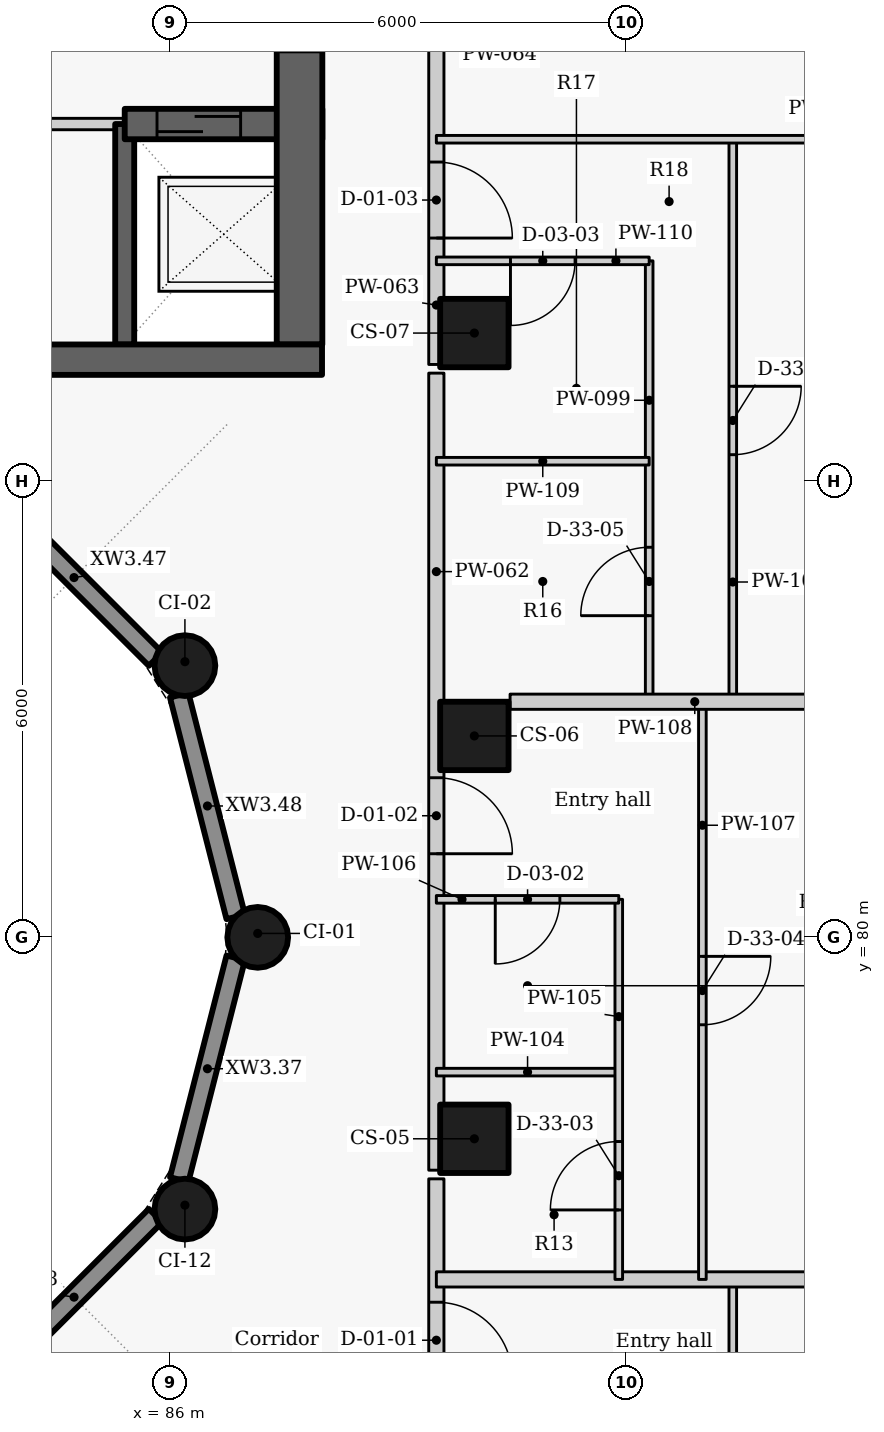
"""IFC4 building model, lengths in metres.
Left out: names, types, materials, properties, quantities, classifications, styles, units other than length and angle.
Written with IfcOpenShell. Run it as: python <this file> out.ifc"""

import sys

from ifc_helpers import new_model, si_unit, direction, frame, frame_2d, origin, origin_2d, place, context, subcontext, project, spatial, rectangle, circle, extrude, element, fill, save


model = new_model("IFC4")
c1 = context("Model", 3, precision=1e-05, world=origin(), true_north=direction((0.0, 1.0)))
c2 = subcontext(c1, "Body", "Model", "MODEL_VIEW")
j1 = project(units=[si_unit("LENGTHUNIT", "METRE"), si_unit("PLANEANGLEUNIT", "RADIAN")], contexts=[c1])
p1 = place(None, origin())
s1 = spatial("IfcSite", under=j1, at=p1, CompositionType="ELEMENT")
p2 = place(p1, origin())
s2 = spatial("IfcBuilding", under=s1, at=p2, CompositionType="ELEMENT")
p3 = place(p2, frame((0.0, 0.0, 259.2)))
s3 = spatial("IfcBuildingStorey", under=s2, at=p3, CompositionType="ELEMENT", Elevation=259.2)
for number, where, z_axis, x_axis in (
    (1, (90.0, 77.35, 0.0), (0.0, 0.0, 1.0), (0.0, 1.0, 0.0)),
    (2, (90.0, 82.65, 0.0), (0.0, 0.0, 1.0), (0.0, 1.0, 0.0)),
    (3, (90.0, 87.95, 0.0), (0.0, 0.0, 1.0), (0.0, 1.0, 0.0)),
):
    element("IfcColumn", number, at=place(p3, frame(where, z_axis=z_axis, x_axis=x_axis)), inside=s3, PredefinedType="COLUMN", context=c2, shape_type="SweptSolid", body=[
        extrude(rectangle(XDim=0.9, YDim=0.9, at=origin_2d()), origin(), (0.0, 0.0, 1.0), 3.3),
    ])
for number, where, z_axis, x_axis in (
    (4, (87.15, 80.0, 0.0), (0.0, 0.0, 1.0), (0.0, 1.0, 0.0)),
    (5, (86.192, 83.575, 0.0), (0.0, 0.0, 1.0), (-0.5, 0.866, 0.0)),
    (6, (86.192, 76.425, 0.0), (0.0, 0.0, 1.0), (0.5, 0.866, 0.0)),
):
    element("IfcColumn", number, at=place(p3, frame(where, z_axis=z_axis, x_axis=x_axis)), inside=s3, PredefinedType="COLUMN", context=c2, shape_type="SweptSolid", body=[
        extrude(circle(Radius=0.4, at=origin_2d()), origin(), (0.0, 0.0, 1.0), 3.3),
    ])
p4 = place(p3, frame((86.86, 79.73, 0.0), z_axis=(0.0, 0.0, 1.0), x_axis=(-0.247055971283, -0.969001211069, 0.0)))
e7 = element("IfcWall", 7, at=p4, inside=s3, PredefinedType="SOLIDWALL", context=c2, shape_type="SweptSolid", body=[
    extrude(rectangle(XDim=3.01, YDim=0.25, at=frame_2d((1.505, 0.0))), origin(), (0.0, 0.0, 1.0), 2.425),
])
for number, where, z_axis, x_axis in (
    (8, (85.806, 76.339, 0.0), (0.0, 0.0, 1.0), (-0.707, -0.707, 0.0)),
    (9, (83.661, 85.806, 0.0), (0.0, 0.0, 1.0), (0.707, -0.707, 0.0)),
):
    element("IfcWall", number, at=place(p3, frame(where, z_axis=z_axis, x_axis=x_axis)), inside=s3, PredefinedType="SOLIDWALL", context=c2, shape_type="SweptSolid", body=[
        extrude(rectangle(XDim=3.033, YDim=0.25, at=frame_2d((1.517, 0.0))), origin(), (0.0, 0.0, 1.0), 2.425),
    ])
p5 = place(p3, frame((86.117, 83.187, 0.0), z_axis=(0.0, 0.0, 1.0), x_axis=(0.247055971283, -0.969001211069, 0.0)))
e10 = element("IfcWall", 10, at=p5, inside=s3, PredefinedType="SOLIDWALL", context=c2, shape_type="SweptSolid", body=[
    extrude(rectangle(XDim=3.01, YDim=0.25, at=frame_2d((1.505, 0.0))), origin(), (0.0, 0.0, 1.0), 2.425),
])
p6 = place(p3, frame((85.4, 90.7, 0.0), z_axis=(0.0, 0.0, 1.0), x_axis=(-1.0, 0.0, 0.0)))
e11 = element("IfcWall", 11, at=p6, inside=s3, PredefinedType="PARTITIONING", context=c2, shape_type="SweptSolid", body=[
    extrude(rectangle(XDim=13.4, YDim=0.15, at=frame_2d((6.7, 0.0))), origin(), (0.0, 0.0, 1.0), 3.025),
])
p7 = place(p6, frame((11.325, 0.0, 0.0)))
e12 = element("IfcOpeningElement", 12, at=p7, cuts=e11, PredefinedType="OPENING", context=c2, shape_type="SweptSolid", body=[
    extrude(rectangle(XDim=0.9, YDim=2.1, at=frame_2d((0.45, 1.05))), frame((0.0, 0.085, 0.0), z_axis=(0.0, -1.0, 0.0), x_axis=(1.0, 0.0, 0.0)), (0.0, 0.0, 1.0), 0.17),
])
p8 = place(p6, frame((9.0, 0.0, 0.0)))
e13 = element("IfcOpeningElement", 13, at=p8, cuts=e11, PredefinedType="OPENING", context=c2, shape_type="SweptSolid", body=[
    extrude(rectangle(XDim=0.9, YDim=2.1, at=frame_2d((0.45, 1.05))), frame((0.0, 0.085, 0.0), z_axis=(0.0, -1.0, 0.0), x_axis=(1.0, 0.0, 0.0)), (0.0, 0.0, 1.0), 0.17),
])
p9 = place(p6, frame((3.6, 0.0, 0.0)))
e14 = element("IfcOpeningElement", 14, at=p9, cuts=e11, PredefinedType="OPENING", context=c2, shape_type="SweptSolid", body=[
    extrude(rectangle(XDim=0.9, YDim=2.1, at=frame_2d((0.45, 1.05))), frame((0.0, 0.085, 0.0), z_axis=(0.0, -1.0, 0.0), x_axis=(1.0, 0.0, 0.0)), (0.0, 0.0, 1.0), 0.17),
])
p10 = place(p3, frame((85.4, 87.8, -0.275), z_axis=(0.0, 0.0, 1.0), x_axis=(0.0, 1.0, 0.0)))
e15 = element("IfcWall", 15, at=p10, inside=s3, PredefinedType="SHEAR", context=c2, shape_type="SweptSolid", body=[
    extrude(rectangle(XDim=2.9, YDim=0.25, at=frame_2d((1.45, 0.0))), origin(), (0.0, 0.0, 1.0), 3.3),
])
p11 = place(p3, frame((85.4, 90.7, -0.275), z_axis=(0.0, 0.0, 1.0), x_axis=(1.0, 0.0, 0.0)))
e16 = element("IfcWall", 16, at=p11, inside=s3, PredefinedType="SHEAR", context=c2, shape_type="SweptSolid", body=[
    extrude(rectangle(XDim=2.6, YDim=0.4, at=frame_2d((1.3, 0.0))), origin(), (0.0, 0.0, 1.0), 3.3),
])
p12 = place(p11, frame((0.425, 0.0, 0.275)))
e17 = element("IfcOpeningElement", 17, at=p12, cuts=e16, PredefinedType="OPENING", context=c2, shape_type="SweptSolid", body=[
    extrude(rectangle(XDim=1.1, YDim=2.1, at=frame_2d((0.55, 1.05))), frame((0.0, 0.21, 0.0), z_axis=(0.0, -1.0, 0.0), x_axis=(1.0, 0.0, 0.0)), (0.0, 0.0, 1.0), 0.42),
])
p13 = place(p3, frame((87.7, 102.05, -0.275), z_axis=(0.0, 0.0, 1.0), x_axis=(0.0, -1.0, 0.0)))
e18 = element("IfcWall", 18, at=p13, inside=s3, PredefinedType="SHEAR", context=c2, shape_type="SweptSolid", body=[
    extrude(rectangle(XDim=14.25, YDim=0.6, at=frame_2d((7.125, 0.0))), origin(), (0.0, 0.0, 1.0), 3.3),
])
p14 = place(p13, frame((8.9, 0.0, 0.275)))
e19 = element("IfcOpeningElement", 19, at=p14, cuts=e18, PredefinedType="OPENING", context=c2, shape_type="SweptSolid", body=[
    extrude(rectangle(XDim=1.5, YDim=2.1, at=frame_2d((0.75, 1.05))), frame((0.0, 0.31, 0.0), z_axis=(0.0, -1.0, 0.0), x_axis=(1.0, 0.0, 0.0)), (0.0, 0.0, 1.0), 0.62),
])
p15 = place(p13, frame((2.025, 0.0, 0.275)))
e20 = element("IfcOpeningElement", 20, at=p15, cuts=e18, PredefinedType="OPENING", context=c2, shape_type="SweptSolid", body=[
    extrude(rectangle(XDim=1.1, YDim=2.1, at=frame_2d((0.55, 1.05))), frame((0.0, 0.31, 0.0), z_axis=(0.0, -1.0, 0.0), x_axis=(1.0, 0.0, 0.0)), (0.0, 0.0, 1.0), 0.62),
])
p16 = place(p3, frame((89.5, 76.823, 0.0), z_axis=(0.0, 0.0, 1.0), x_axis=(0.0, -1.0, 0.0)))
e21 = element("IfcWall", 21, at=p16, inside=s3, PredefinedType="PARTITIONING", context=c2, shape_type="SweptSolid", body=[
    extrude(rectangle(XDim=5.186, YDim=0.2, at=frame_2d((2.593, 0.0))), origin(), (0.0, 0.0, 1.0), 3.025),
])
p17 = place(p16, frame((1.623, 0.0, 0.0)))
e22 = element("IfcOpeningElement", 22, at=p17, cuts=e21, PredefinedType="OPENING", context=c2, shape_type="SweptSolid", body=[
    extrude(rectangle(XDim=1.0, YDim=2.1, at=frame_2d((0.5, 1.05))), frame((0.0, 0.11, 0.0), z_axis=(0.0, -1.0, 0.0), x_axis=(1.0, 0.0, 0.0)), (0.0, 0.0, 1.0), 0.22),
])
p18 = place(p3, frame((89.5, 87.423, 0.0), z_axis=(0.0, 0.0, 1.0), x_axis=(0.0, -1.0, 0.0)))
e23 = element("IfcWall", 23, at=p18, inside=s3, PredefinedType="PARTITIONING", context=c2, shape_type="SweptSolid", body=[
    extrude(rectangle(XDim=10.486, YDim=0.2, at=frame_2d((5.243, 0.0))), origin(), (0.0, 0.0, 1.0), 3.025),
])
p19 = place(p18, frame((5.323, 0.0, 0.0)))
e24 = element("IfcOpeningElement", 24, at=p19, cuts=e23, PredefinedType="OPENING", context=c2, shape_type="SweptSolid", body=[
    extrude(rectangle(XDim=1.0, YDim=2.1, at=frame_2d((0.5, 1.05))), frame((0.0, 0.11, 0.0), z_axis=(0.0, -1.0, 0.0), x_axis=(1.0, 0.0, 0.0)), (0.0, 0.0, 1.0), 0.22),
])
p20 = place(p3, frame((89.5, 91.773, 0.0), z_axis=(0.0, 0.0, 1.0), x_axis=(0.0, -1.0, 0.0)))
e25 = element("IfcWall", 25, at=p20, inside=s3, PredefinedType="PARTITIONING", context=c2, shape_type="SweptSolid", body=[
    extrude(rectangle(XDim=4.236, YDim=0.2, at=frame_2d((2.118, 0.0))), origin(), (0.0, 0.0, 1.0), 3.025),
])
p21 = place(p20, frame((1.573, 0.0, 0.0)))
e26 = element("IfcOpeningElement", 26, at=p21, cuts=e25, PredefinedType="OPENING", context=c2, shape_type="SweptSolid", body=[
    extrude(rectangle(XDim=1.0, YDim=2.1, at=frame_2d((0.5, 1.05))), frame((0.0, 0.11, 0.0), z_axis=(0.0, -1.0, 0.0), x_axis=(1.0, 0.0, 0.0)), (0.0, 0.0, 1.0), 0.22),
])
p22 = place(p3, frame((92.3, 83.1, 0.0), z_axis=(0.0, 0.0, 1.0), x_axis=(0.0, 1.0, 0.0)))
e27 = element("IfcWall", 27, at=p22, inside=s3, PredefinedType="PARTITIONING", context=c2, shape_type="SweptSolid", body=[
    extrude(rectangle(XDim=5.8, YDim=0.1, at=frame_2d((2.9, 0.0))), origin(), (0.0, 0.0, 1.0), 3.025),
])
p23 = place(p22, frame((1.132, 0.0, 0.0)))
e28 = element("IfcOpeningElement", 28, at=p23, cuts=e27, PredefinedType="OPENING", context=c2, shape_type="SweptSolid", body=[
    extrude(rectangle(XDim=0.9, YDim=2.1, at=frame_2d((0.45, 1.05))), frame((0.0, 0.06, 0.0), z_axis=(0.0, -1.0, 0.0), x_axis=(1.0, 0.0, 0.0)), (0.0, 0.0, 1.0), 0.12),
])
p24 = place(p3, frame((93.4, 75.5, 0.0), z_axis=(0.0, 0.0, 1.0), x_axis=(0.0, -1.0, 0.0)))
e29 = element("IfcWall", 29, at=p24, inside=s3, PredefinedType="PARTITIONING", context=c2, shape_type="SweptSolid", body=[
    extrude(rectangle(XDim=9.05, YDim=0.1, at=frame_2d((4.525, 0.0))), origin(), (0.0, 0.0, 1.0), 3.025),
])
p25 = place(p24, frame((4.075, 0.0, 0.0)))
e30 = element("IfcOpeningElement", 30, at=p25, cuts=e29, PredefinedType="OPENING", context=c2, shape_type="SweptSolid", body=[
    extrude(rectangle(XDim=0.9, YDim=2.1, at=frame_2d((0.45, 1.05))), frame((0.0, 0.06, 0.0), z_axis=(0.0, -1.0, 0.0), x_axis=(1.0, 0.0, 0.0)), (0.0, 0.0, 1.0), 0.12),
])
p26 = place(p3, frame((93.4, 90.5, 0.0), z_axis=(0.0, 0.0, 1.0), x_axis=(0.0, -1.0, 0.0)))
e31 = element("IfcWall", 31, at=p26, inside=s3, PredefinedType="PARTITIONING", context=c2, shape_type="SweptSolid", body=[
    extrude(rectangle(XDim=7.4, YDim=0.1, at=frame_2d((3.7, 0.0))), origin(), (0.0, 0.0, 1.0), 3.025),
])
p27 = place(p26, frame((3.25, 0.0, 0.0)))
e32 = element("IfcOpeningElement", 32, at=p27, cuts=e31, PredefinedType="OPENING", context=c2, shape_type="SweptSolid", body=[
    extrude(rectangle(XDim=0.9, YDim=2.1, at=frame_2d((0.45, 1.05))), frame((0.0, 0.06, 0.0), z_axis=(0.0, -1.0, 0.0), x_axis=(1.0, 0.0, 0.0)), (0.0, 0.0, 1.0), 0.12),
])
p28 = place(p3, frame((89.5, 75.5, 0.0), z_axis=(0.0, 0.0, 1.0), x_axis=(1.0, 0.0, 0.0)))
e33 = element("IfcWall", 33, at=p28, inside=s3, PredefinedType="PARTITIONING", context=c2, shape_type="SweptSolid", body=[
    extrude(rectangle(XDim=13.709, YDim=0.2, at=frame_2d((6.855, 0.0))), origin(), (0.0, 0.0, 1.0), 2.405),
])
p29 = place(p3, frame((89.5, 78.227, 0.0), z_axis=(0.0, 0.0, 1.0), x_axis=(1.0, 0.0, 0.0)))
e34 = element("IfcWall", 34, at=p29, inside=s3, PredefinedType="PARTITIONING", context=c2, shape_type="SweptSolid", body=[
    extrude(rectangle(XDim=2.4, YDim=0.1, at=frame_2d((1.2, 0.0))), origin(), (0.0, 0.0, 1.0), 2.505),
])
p30 = place(p3, frame((91.9, 75.5, 0.0), z_axis=(0.0, 0.0, 1.0), x_axis=(0.0, 1.0, 0.0)))
e35 = element("IfcWall", 35, at=p30, inside=s3, PredefinedType="PARTITIONING", context=c2, shape_type="SweptSolid", body=[
    extrude(rectangle(XDim=5.0, YDim=0.1, at=frame_2d((2.5, 0.0))), origin(), (0.0, 0.0, 1.0), 3.025),
])
p31 = place(p30, frame((0.914, 0.0, 0.0)))
e36 = element("IfcOpeningElement", 36, at=p31, cuts=e35, PredefinedType="OPENING", context=c2, shape_type="SweptSolid", body=[
    extrude(rectangle(XDim=0.9, YDim=2.1, at=frame_2d((0.45, 1.05))), frame((0.0, 0.06, 0.0), z_axis=(0.0, -1.0, 0.0), x_axis=(1.0, 0.0, 0.0)), (0.0, 0.0, 1.0), 0.12),
])
p32 = place(p3, frame((91.9, 80.5, 0.0), z_axis=(0.0, 0.0, 1.0), x_axis=(-1.0, 0.0, 0.0)))
e37 = element("IfcWall", 37, at=p32, inside=s3, PredefinedType="PARTITIONING", context=c2, shape_type="SweptSolid", body=[
    extrude(rectangle(XDim=2.4, YDim=0.1, at=frame_2d((1.2, 0.0))), origin(), (0.0, 0.0, 1.0), 2.505),
])
p33 = place(p32, frame((0.775, 0.0, 0.0)))
e38 = element("IfcOpeningElement", 38, at=p33, cuts=e37, PredefinedType="OPENING", context=c2, shape_type="SweptSolid", body=[
    extrude(rectangle(XDim=0.85, YDim=2.1, at=frame_2d((0.425, 1.05))), frame((0.0, 0.06, 0.0), z_axis=(0.0, -1.0, 0.0), x_axis=(1.0, 0.0, 0.0)), (0.0, 0.0, 1.0), 0.12),
])
p34 = place(p3, frame((93.0, 83.1, 0.0), z_axis=(0.0, 0.0, 1.0), x_axis=(0.0, -1.0, 0.0)))
e39 = element("IfcWall", 39, at=p34, inside=s3, PredefinedType="PARTITIONING", context=c2, shape_type="SweptSolid", body=[
    extrude(rectangle(XDim=7.6, YDim=0.1, at=frame_2d((3.8, 0.0))), origin(), (0.0, 0.0, 1.0), 3.025),
])
p35 = place(p34, frame((3.35, 0.0, 0.0)))
e40 = element("IfcOpeningElement", 40, at=p35, cuts=e39, PredefinedType="OPENING", context=c2, shape_type="SweptSolid", body=[
    extrude(rectangle(XDim=0.9, YDim=2.1, at=frame_2d((0.45, 1.05))), frame((0.0, 0.06, 0.0), z_axis=(0.0, -1.0, 0.0), x_axis=(1.0, 0.0, 0.0)), (0.0, 0.0, 1.0), 0.12),
])
p36 = place(p3, frame((90.47, 83.1, 0.0), z_axis=(0.0, 0.0, 1.0), x_axis=(1.0, 0.0, 0.0)))
e41 = element("IfcWall", 41, at=p36, inside=s3, PredefinedType="PARTITIONING", context=c2, shape_type="SweptSolid", body=[
    extrude(rectangle(XDim=4.86, YDim=0.2, at=frame_2d((2.43, 0.0))), origin(), (0.0, 0.0, 1.0), 3.025),
])
p37 = place(p3, frame((89.5, 86.264, 0.0), z_axis=(0.0, 0.0, 1.0), x_axis=(1.0, 0.0, 0.0)))
e42 = element("IfcWall", 42, at=p37, inside=s3, PredefinedType="PARTITIONING", context=c2, shape_type="SweptSolid", body=[
    extrude(rectangle(XDim=2.8, YDim=0.1, at=frame_2d((1.4, 0.0))), origin(), (0.0, 0.0, 1.0), 2.505),
])
p38 = place(p3, frame((92.3, 88.9, 0.0), z_axis=(0.0, 0.0, 1.0), x_axis=(-1.0, 0.0, 0.0)))
e43 = element("IfcWall", 43, at=p38, inside=s3, PredefinedType="PARTITIONING", context=c2, shape_type="SweptSolid", body=[
    extrude(rectangle(XDim=2.8, YDim=0.1, at=frame_2d((1.4, 0.0))), origin(), (0.0, 0.0, 1.0), 2.505),
])
p39 = place(p38, frame((0.975, 0.0, 0.0)))
e44 = element("IfcOpeningElement", 44, at=p39, cuts=e43, PredefinedType="OPENING", context=c2, shape_type="SweptSolid", body=[
    extrude(rectangle(XDim=0.85, YDim=2.1, at=frame_2d((0.425, 1.05))), frame((0.0, 0.06, 0.0), z_axis=(0.0, -1.0, 0.0), x_axis=(1.0, 0.0, 0.0)), (0.0, 0.0, 1.0), 0.12),
])
p40 = place(p3, frame((89.5, 90.5, 0.0), z_axis=(0.0, 0.0, 1.0), x_axis=(1.0, 0.0, 0.0)))
e45 = element("IfcWall", 45, at=p40, inside=s3, PredefinedType="PARTITIONING", context=c2, shape_type="SweptSolid", body=[
    extrude(rectangle(XDim=10.245, YDim=0.1, at=frame_2d((5.123, 0.0))), origin(), (0.0, 0.0, 1.0), 2.405),
])
p41 = place(p3, frame((72.004, 87.6, -0.275), z_axis=(0.0, 0.0, 1.0), x_axis=(1.0, 0.0, 0.0)))
e46 = element("IfcWall", 46, at=p41, inside=s3, PredefinedType="SHEAR", context=c2, shape_type="SweptSolid", body=[
    extrude(rectangle(XDim=15.992, YDim=0.4, at=frame_2d((7.996, 0.0))), origin(), (0.0, 0.0, 1.0), 3.3),
])
p42 = place(p12, origin())
e47 = element("IfcDoor", 47, at=p42, inside=s3, OperationType="SLIDING_TO_LEFT", PredefinedType="DOOR", context=c2, shape_type="SweptSolid", body=[
    extrude(rectangle(XDim=1.1, YDim=2.1, at=frame_2d((0.55, 1.05))), frame((0.0, 0.025, 0.0), z_axis=(0.0, -1.0, 0.0), x_axis=(1.0, 0.0, 0.0)), (0.0, 0.0, 1.0), 0.05),
])
fill(e17, e47)
p43 = place(p17, origin())
e48 = element("IfcDoor", 48, at=p43, inside=s3, OperationType="SINGLE_SWING_RIGHT", PredefinedType="DOOR", context=c2, shape_type="SweptSolid", body=[
    extrude(rectangle(XDim=1.0, YDim=2.1, at=frame_2d((0.5, 1.05))), frame((0.0, 0.025, 0.0), z_axis=(0.0, -1.0, 0.0), x_axis=(1.0, 0.0, 0.0)), (0.0, 0.0, 1.0), 0.05),
])
fill(e22, e48)
p44 = place(p19, origin())
e49 = element("IfcDoor", 49, at=p44, inside=s3, OperationType="SINGLE_SWING_RIGHT", PredefinedType="DOOR", context=c2, shape_type="SweptSolid", body=[
    extrude(rectangle(XDim=1.0, YDim=2.1, at=frame_2d((0.5, 1.05))), frame((0.0, 0.025, 0.0), z_axis=(0.0, -1.0, 0.0), x_axis=(1.0, 0.0, 0.0)), (0.0, 0.0, 1.0), 0.05),
])
fill(e24, e49)
p45 = place(p31, origin())
e50 = element("IfcDoor", 50, at=p45, inside=s3, OperationType="SINGLE_SWING_LEFT", PredefinedType="DOOR", context=c2, shape_type="SweptSolid", body=[
    extrude(rectangle(XDim=0.9, YDim=2.1, at=frame_2d((0.45, 1.05))), frame((0.0, 0.025, 0.0), z_axis=(0.0, -1.0, 0.0), x_axis=(1.0, 0.0, 0.0)), (0.0, 0.0, 1.0), 0.05),
])
fill(e36, e50)
p46 = place(p33, origin())
e51 = element("IfcDoor", 51, at=p46, inside=s3, OperationType="SINGLE_SWING_RIGHT", PredefinedType="DOOR", context=c2, shape_type="SweptSolid", body=[
    extrude(rectangle(XDim=0.85, YDim=2.1, at=frame_2d((0.425, 1.05))), frame((0.0, 0.025, 0.0), z_axis=(0.0, -1.0, 0.0), x_axis=(1.0, 0.0, 0.0)), (0.0, 0.0, 1.0), 0.05),
])
fill(e38, e51)
p47 = place(p35, origin())
e52 = element("IfcDoor", 52, at=p47, inside=s3, OperationType="SINGLE_SWING_LEFT", PredefinedType="DOOR", context=c2, shape_type="SweptSolid", body=[
    extrude(rectangle(XDim=0.9, YDim=2.1, at=frame_2d((0.45, 1.05))), frame((0.0, 0.025, 0.0), z_axis=(0.0, -1.0, 0.0), x_axis=(1.0, 0.0, 0.0)), (0.0, 0.0, 1.0), 0.05),
])
fill(e40, e52)
p48 = place(p21, origin())
e53 = element("IfcDoor", 53, at=p48, inside=s3, OperationType="SINGLE_SWING_RIGHT", PredefinedType="DOOR", context=c2, shape_type="SweptSolid", body=[
    extrude(rectangle(XDim=1.0, YDim=2.1, at=frame_2d((0.5, 1.05))), frame((0.0, 0.025, 0.0), z_axis=(0.0, -1.0, 0.0), x_axis=(1.0, 0.0, 0.0)), (0.0, 0.0, 1.0), 0.05),
])
fill(e26, e53)
p49 = place(p23, origin())
e54 = element("IfcDoor", 54, at=p49, inside=s3, OperationType="SINGLE_SWING_LEFT", PredefinedType="DOOR", context=c2, shape_type="SweptSolid", body=[
    extrude(rectangle(XDim=0.9, YDim=2.1, at=frame_2d((0.45, 1.05))), frame((0.0, 0.025, 0.0), z_axis=(0.0, -1.0, 0.0), x_axis=(1.0, 0.0, 0.0)), (0.0, 0.0, 1.0), 0.05),
])
fill(e28, e54)
p50 = place(p39, origin())
e55 = element("IfcDoor", 55, at=p50, inside=s3, OperationType="SINGLE_SWING_RIGHT", PredefinedType="DOOR", context=c2, shape_type="SweptSolid", body=[
    extrude(rectangle(XDim=0.85, YDim=2.1, at=frame_2d((0.425, 1.05))), frame((0.0, 0.025, 0.0), z_axis=(0.0, -1.0, 0.0), x_axis=(1.0, 0.0, 0.0)), (0.0, 0.0, 1.0), 0.05),
])
fill(e44, e55)
p51 = place(p27, origin())
e56 = element("IfcDoor", 56, at=p51, inside=s3, OperationType="SINGLE_SWING_LEFT", PredefinedType="DOOR", context=c2, shape_type="SweptSolid", body=[
    extrude(rectangle(XDim=0.9, YDim=2.1, at=frame_2d((0.45, 1.05))), frame((0.0, 0.025, 0.0), z_axis=(0.0, -1.0, 0.0), x_axis=(1.0, 0.0, 0.0)), (0.0, 0.0, 1.0), 0.05),
])
fill(e32, e56)
save(model, sys.argv[1])
